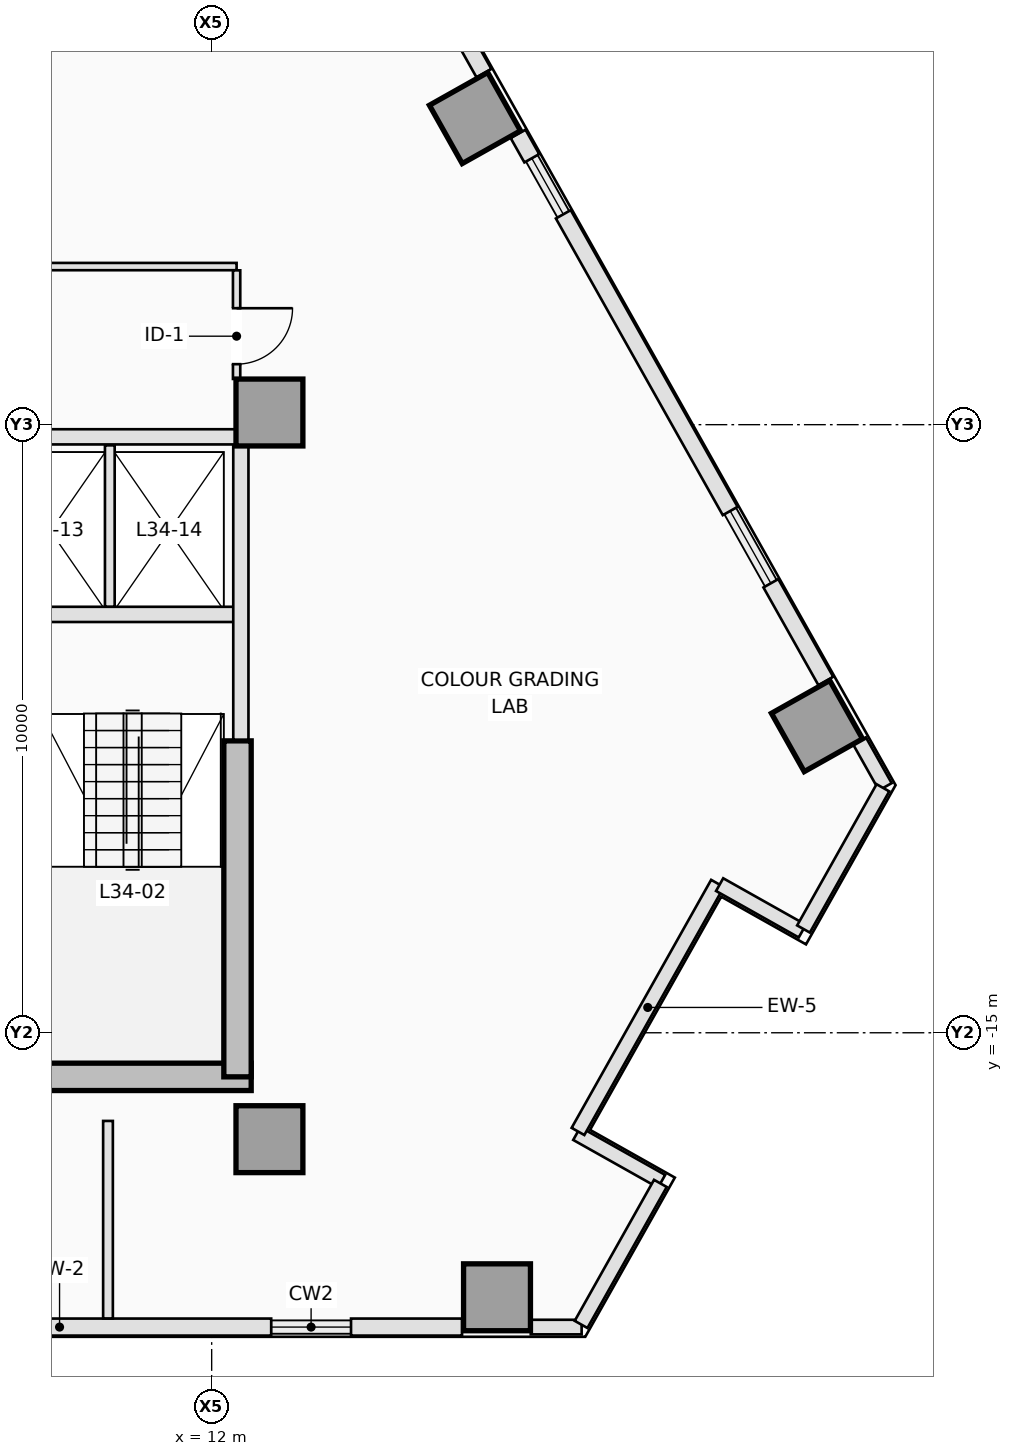
"""IFC4 building model, lengths in metres.
Left out: names, types, materials, properties, quantities, classifications, styles, units other than length and angle.
Written with IfcOpenShell. Run it as: python <this file> out.ifc"""

import sys

from ifc_helpers import new_model, si_unit, direction, frame, frame_2d, origin, origin_2d, place, context, subcontext, project, spatial, rectangle, extrude, element, fill, save


model = new_model("IFC4")
c1 = context("Model", 3, precision=1e-05, world=origin(), true_north=direction((0.0, 1.0)))
c2 = subcontext(c1, "Body", "Model", "MODEL_VIEW")
j1 = project(units=[si_unit("LENGTHUNIT", "METRE"), si_unit("PLANEANGLEUNIT", "RADIAN")], contexts=[c1])
p1 = place(None, origin())
s1 = spatial("IfcSite", under=j1, at=p1, CompositionType="ELEMENT")
p2 = place(p1, origin())
s2 = spatial("IfcBuilding", under=s1, at=p2, CompositionType="ELEMENT")
p3 = place(p2, frame((0.0, 0.0, 126.5)))
s3 = spatial("IfcBuildingStorey", under=s2, at=p3, CompositionType="ELEMENT", Elevation=126.5)
p4 = place(p3, frame((8.75, -15.725, 0.0), z_axis=(0.0, 0.0, 1.0), x_axis=(1.0, 0.0, 0.0)))
e1 = element("IfcWall", 1, at=p4, inside=s3, PredefinedType="SHEAR", context=c2, shape_type="SweptSolid", body=[
    extrude(rectangle(XDim=3.9, YDim=0.45, at=frame_2d((1.95, 0.0))), origin(), (0.0, 0.0, 1.0), 3.5),
])
p5 = place(p3, frame((12.425, -15.725, 0.0), z_axis=(0.0, 0.0, 1.0), x_axis=(0.0, 1.0, 0.0)))
e2 = element("IfcWall", 2, at=p5, inside=s3, PredefinedType="SHEAR", context=c2, shape_type="SweptSolid", body=[
    extrude(rectangle(XDim=5.525, YDim=0.45, at=frame_2d((2.763, 0.0))), origin(), (0.0, 0.0, 1.0), 3.5),
])
for number, where, z_axis, x_axis in (
    (3, (12.95, -16.75, 0.0), (0.0, 0.0, 1.0), (1.0, 0.0, 0.0)),
    (4, (12.95, -4.8, 0.0), (0.0, 0.0, 1.0), (1.0, 0.0, 0.0)),
    (5, (16.692, -19.35, 0.0), (0.0, 0.0, 1.0), (0.0, 1.0, 0.0)),
    (6, (21.955, -9.957, 0.0), (0.0, 0.0, 1.0), (0.872, 0.49, 0.0)),
    (7, (16.33, 0.043, 0.0), (0.0, 0.0, 1.0), (0.872, 0.49, 0.0)),
):
    element("IfcColumn", number, at=place(p3, frame(where, z_axis=z_axis, x_axis=x_axis)), inside=s3, PredefinedType="COLUMN", context=c2, shape_type="SweptSolid", body=[
        extrude(rectangle(XDim=1.1, YDim=1.1, at=origin_2d()), origin(), (0.0, 0.0, 1.0), 3.5),
    ])
p6 = place(p3, frame((18.084, -19.84, 0.0), z_axis=(0.0, 0.0, 1.0), x_axis=(-1.0, 0.0, 0.0)))
e8 = element("IfcWall", 8, at=p6, inside=s3, PredefinedType="STANDARD", context=c2, shape_type="SweptSolid", body=[
    extrude(rectangle(XDim=0.836, YDim=0.24, at=frame_2d((0.418, 0.0))), origin(), (0.0, 0.0, 1.0), 3.25),
])
p7 = place(p3, frame((16.117, -19.84, 0.0), z_axis=(0.0, 0.0, 1.0), x_axis=(-1.0, 0.0, 0.0)))
e9 = element("IfcWall", 9, at=p7, inside=s3, PredefinedType="STANDARD", context=c2, shape_type="SweptSolid", body=[
    extrude(rectangle(XDim=1.826, YDim=0.28, at=frame_2d((0.913, 0.0))), origin(), (0.0, 0.0, 1.0), 3.25),
])
p8 = place(p3, frame((12.979, -19.84, 0.0), z_axis=(0.0, 0.0, 1.0), x_axis=(-1.0, 0.0, 0.0)))
e10 = element("IfcWall", 10, at=p8, inside=s3, PredefinedType="STANDARD", context=c2, shape_type="SweptSolid", body=[
    extrude(rectangle(XDim=6.96, YDim=0.28, at=frame_2d((3.48, 0.0))), origin(), (0.0, 0.0, 1.0), 3.25),
])
p9 = place(p3, frame((22.654, -10.2, 0.0), z_axis=(0.0, 0.0, 1.0), x_axis=(0.490355003566, -0.871522788272, 0.0)))
e11 = element("IfcWall", 11, at=p9, inside=s3, PredefinedType="STANDARD", context=c2, shape_type="SweptSolid", body=[
    extrude(rectangle(XDim=0.865, YDim=0.24, at=frame_2d((0.433, 0.0))), origin(), (0.0, 0.0, 1.0), 3.25),
])
p10 = place(p3, frame((17.039, -0.218, 0.0), z_axis=(0.0, 0.0, 1.0), x_axis=(0.490009165718, -0.871717280724, 0.0)))
e12 = element("IfcWall", 12, at=p10, inside=s3, PredefinedType="STANDARD", context=c2, shape_type="SweptSolid", body=[
    extrude(rectangle(XDim=0.46, YDim=0.28, at=frame_2d((0.23, 0.0))), origin(), (0.0, 0.0, 1.0), 3.25),
])
p11 = place(p3, frame((17.783, -1.541, 0.0), z_axis=(0.0, 0.0, 1.0), x_axis=(0.490265381388, -0.871573207374, 0.0)))
e13 = element("IfcWall", 13, at=p11, inside=s3, PredefinedType="STANDARD", context=c2, shape_type="SweptSolid", body=[
    extrude(rectangle(XDim=5.597, YDim=0.28, at=frame_2d((2.799, 0.0))), origin(), (0.0, 0.0, 1.0), 3.25),
])
p12 = place(p3, frame((21.196, -7.608, 0.0), z_axis=(0.0, 0.0, 1.0), x_axis=(0.490280102884, -0.871564926277, 0.0)))
e14 = element("IfcWall", 14, at=p12, inside=s3, PredefinedType="STANDARD", context=c2, shape_type="SweptSolid", body=[
    extrude(rectangle(XDim=1.844, YDim=0.28, at=frame_2d((0.922, 0.0))), origin(), (0.0, 0.0, 1.0), 3.25),
])
p13 = place(p3, frame((14.37, 4.527, 0.0), z_axis=(0.0, 0.0, 1.0), x_axis=(0.490293592365, -0.871557337922, 0.0)))
e15 = element("IfcWall", 15, at=p13, inside=s3, PredefinedType="STANDARD", context=c2, shape_type="SweptSolid", body=[
    extrude(rectangle(XDim=4.299, YDim=0.28, at=frame_2d((2.15, 0.0))), origin(), (0.0, 0.0, 1.0), 3.25),
])
p14 = place(p3, frame((19.399, -17.442, 0.0), z_axis=(0.0, 0.0, 1.0), x_axis=(-0.871575537125, 0.490261239633, 0.0)))
e16 = element("IfcWall", 16, at=p14, inside=s3, PredefinedType="STANDARD", context=c2, shape_type="SweptSolid", body=[
    extrude(rectangle(XDim=1.6, YDim=0.24, at=frame_2d((0.8, 0.0))), origin(), (0.0, 0.0, 1.0), 3.25),
])
p15 = place(p3, frame((18.024, -16.623, 0.0), z_axis=(0.0, 0.0, 1.0), x_axis=(0.490273623647, 0.871568571001, 0.0)))
e17 = element("IfcWall", 17, at=p15, inside=s3, PredefinedType="STANDARD", context=c2, shape_type="SweptSolid", body=[
    extrude(rectangle(XDim=4.68, YDim=0.24, at=frame_2d((2.34, 0.0))), origin(), (0.0, 0.0, 1.0), 1.75),
])
p16 = place(p3, frame((20.354, -12.564, 0.0), z_axis=(0.0, 0.0, 1.0), x_axis=(0.871546278971, -0.490313250496, 0.0)))
e18 = element("IfcWall", 18, at=p16, inside=s3, PredefinedType="STANDARD", context=c2, shape_type="SweptSolid", body=[
    extrude(rectangle(XDim=1.56, YDim=0.24, at=frame_2d((0.78, 0.0))), origin(), (0.0, 0.0, 1.0), 3.25),
])
p17 = place(p3, frame((21.733, -13.294, 0.0), z_axis=(0.0, 0.0, 1.0), x_axis=(0.490265590412, 0.871573089797, 0.0)))
e19 = element("IfcWall", 19, at=p17, inside=s3, PredefinedType="STANDARD", context=c2, shape_type="SweptSolid", body=[
    extrude(rectangle(XDim=2.664, YDim=0.24, at=frame_2d((1.332, 0.0))), origin(), (0.0, 0.0, 1.0), 3.25),
])
p18 = place(p3, frame((18.075, -19.796, 0.0), z_axis=(0.0, 0.0, 1.0), x_axis=(0.490248170584, 0.871582888335, 0.0)))
e20 = element("IfcWall", 20, at=p18, inside=s3, PredefinedType="STANDARD", context=c2, shape_type="SweptSolid", body=[
    extrude(rectangle(XDim=2.661, YDim=0.24, at=frame_2d((1.331, 0.0))), origin(), (0.0, 0.0, 1.0), 3.25),
])
p19 = place(p3, frame((9.16, -8.12, 0.0), z_axis=(0.0, 0.0, 1.0), x_axis=(1.0, 0.0, 0.0)))
e21 = element("IfcWall", 21, at=p19, inside=s3, PredefinedType="PARTITIONING", context=c2, shape_type="SweptSolid", body=[
    extrude(rectangle(XDim=3.22, YDim=0.25, at=frame_2d((1.61, 0.0))), origin(), (0.0, 0.0, 1.0), 3.25),
])
p20 = place(p3, frame((12.48, -10.18, 0.0), z_axis=(0.0, 0.0, 1.0), x_axis=(0.0, 1.0, 0.0)))
e22 = element("IfcWall", 22, at=p20, inside=s3, PredefinedType="PARTITIONING", context=c2, shape_type="SweptSolid", body=[
    extrude(rectangle(XDim=4.828, YDim=0.25, at=frame_2d((2.414, 0.0))), origin(), (0.0, 0.0, 1.0), 3.25),
])
p21 = place(p3, frame((4.302, -5.2, 0.0), z_axis=(0.0, 0.0, 1.0), x_axis=(1.0, 0.0, 0.0)))
e23 = element("IfcWall", 23, at=p21, inside=s3, PredefinedType="PARTITIONING", context=c2, shape_type="SweptSolid", body=[
    extrude(rectangle(XDim=8.096, YDim=0.25, at=frame_2d((4.048, 0.0))), origin(), (0.0, 0.0, 1.0), 3.25),
])
p22 = place(p3, frame((10.325, -7.993, 0.0), z_axis=(0.0, 0.0, 1.0), x_axis=(0.0, 1.0, 0.0)))
e24 = element("IfcWall", 24, at=p22, inside=s3, PredefinedType="PARTITIONING", context=c2, shape_type="SweptSolid", body=[
    extrude(rectangle(XDim=2.653, YDim=0.16, at=frame_2d((1.326, 0.0))), origin(), (0.0, 0.0, 1.0), 3.25),
])
p23 = place(p3, frame((8.382, -2.4, 0.0), z_axis=(0.0, 0.0, 1.0), x_axis=(1.0, 0.0, 0.0)))
e25 = element("IfcWall", 25, at=p23, inside=s3, PredefinedType="PARTITIONING", context=c2, shape_type="SweptSolid", body=[
    extrude(rectangle(XDim=4.028, YDim=0.12, at=frame_2d((2.014, 0.0))), origin(), (0.0, 0.0, 1.0), 3.25),
])
p24 = place(p3, frame((12.41, -2.462, 0.0), z_axis=(0.0, 0.0, 1.0), x_axis=(0.0, -1.0, 0.0)))
e26 = element("IfcWall", 26, at=p24, inside=s3, PredefinedType="PARTITIONING", context=c2, shape_type="SweptSolid", body=[
    extrude(rectangle(XDim=1.786, YDim=0.12, at=frame_2d((0.893, 0.0))), origin(), (0.0, 0.0, 1.0), 3.25),
])
p25 = place(p24, frame((0.623, 0.0, 0.0)))
e27 = element("IfcOpeningElement", 27, at=p25, cuts=e26, PredefinedType="OPENING", context=c2, shape_type="SweptSolid", body=[
    extrude(rectangle(XDim=0.92, YDim=2.12, at=frame_2d((0.46, 1.06))), frame((0.0, 0.07, 0.0), z_axis=(0.0, -1.0, 0.0), x_axis=(1.0, 0.0, 0.0)), (0.0, 0.0, 1.0), 0.14),
])
p26 = place(p3, frame((10.295, -19.698, 0.0), z_axis=(0.0, 0.0, 1.0), x_axis=(0.0, 1.0, 0.0)))
e28 = element("IfcWall", 28, at=p26, inside=s3, PredefinedType="PARTITIONING", context=c2, shape_type="SweptSolid", body=[
    extrude(rectangle(XDim=3.248, YDim=0.16, at=frame_2d((1.624, 0.0))), origin(), (0.0, 0.0, 1.0), 3.25),
])
p27 = place(p25, origin())
e29 = element("IfcDoor", 29, at=p27, inside=s3, OperationType="SINGLE_SWING_LEFT", PredefinedType="DOOR", context=c2, shape_type="SweptSolid", body=[
    extrude(rectangle(XDim=0.92, YDim=2.12, at=frame_2d((0.46, 1.06))), frame((0.0, 0.025, 0.0), z_axis=(0.0, -1.0, 0.0), x_axis=(1.0, 0.0, 0.0)), (0.0, 0.0, 1.0), 0.05),
])
fill(e27, e29)
save(model, sys.argv[1])
